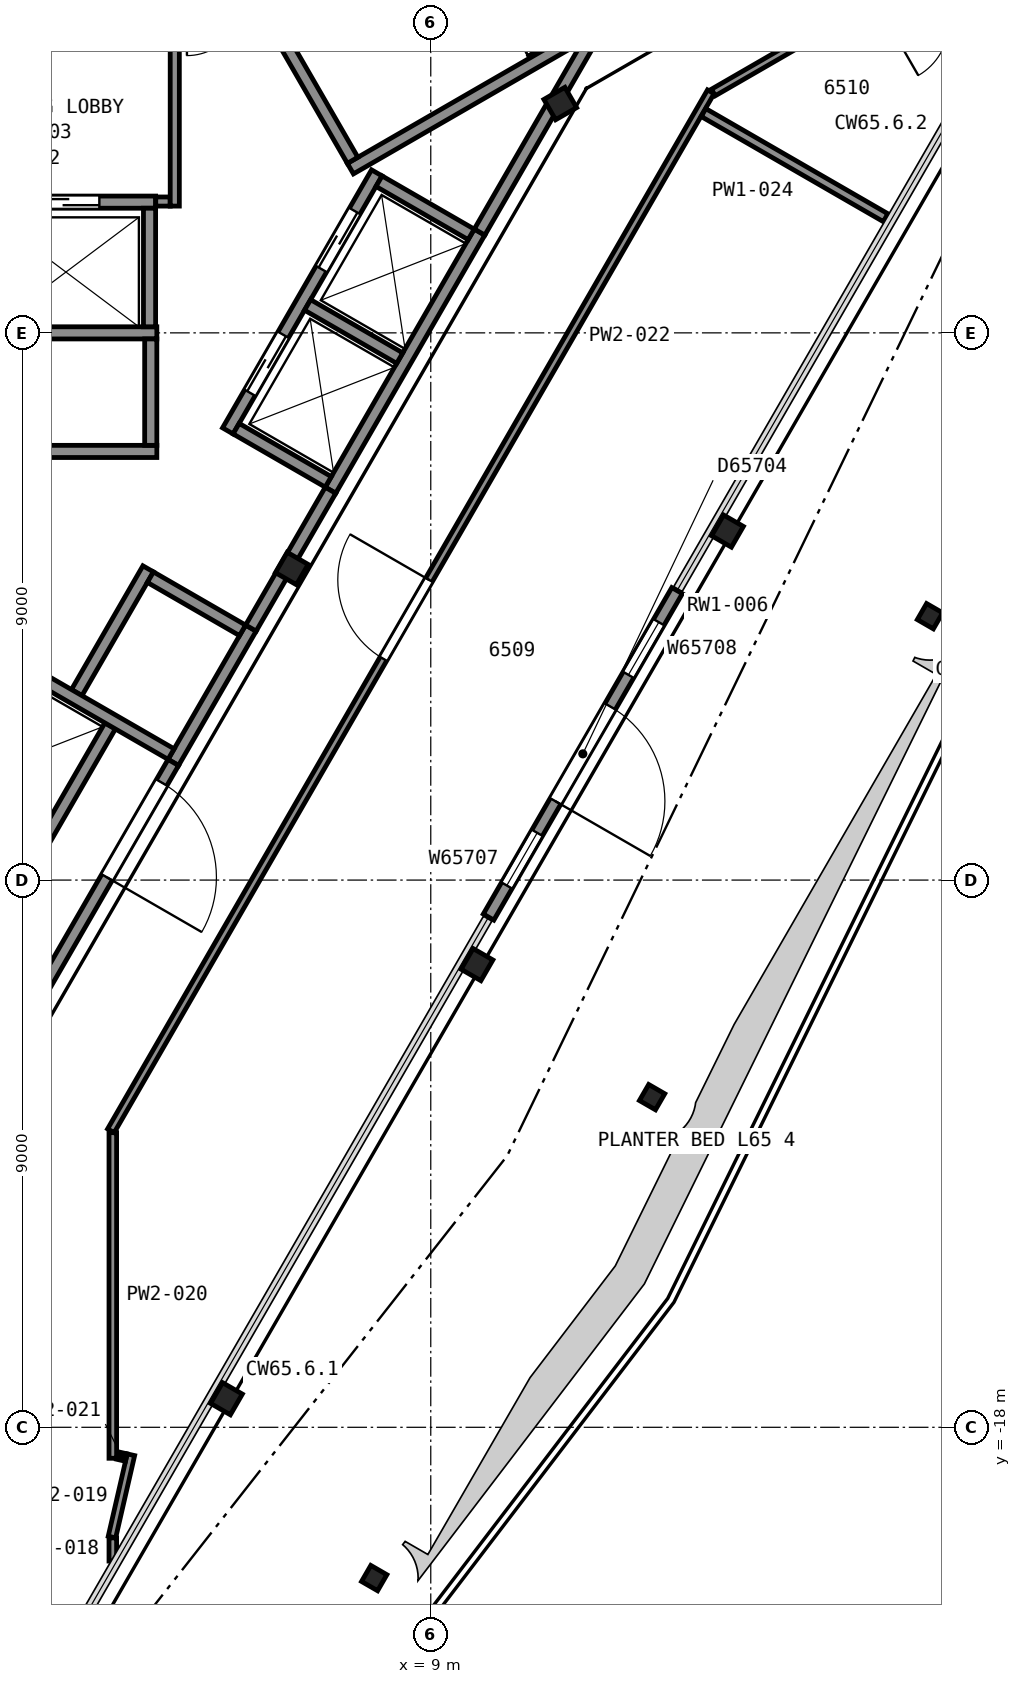
"""IFC4 building model, lengths in metres.
Left out: names, types, materials, properties, quantities, classifications, styles, units other than length and angle.
Written with IfcOpenShell. Run it as: python <this file> out.ifc"""

import sys

from ifc_helpers import new_model, si_unit, direction, frame, frame_2d, origin, origin_2d, place, context, subcontext, project, spatial, rectangle, hollow_rectangle, i_section, extrude, element, fill, save


model = new_model("IFC4")
c1 = context("Model", 3, precision=1e-05, world=origin(), true_north=direction((0.0, 1.0)))
c2 = subcontext(c1, "Body", "Model", "MODEL_VIEW")
j1 = project(units=[si_unit("LENGTHUNIT", "METRE"), si_unit("PLANEANGLEUNIT", "RADIAN")], contexts=[c1])
p1 = place(None, origin())
s1 = spatial("IfcSite", under=j1, at=p1, CompositionType="ELEMENT")
p2 = place(p1, origin())
s2 = spatial("IfcBuilding", under=s1, at=p2, CompositionType="ELEMENT")
p3 = place(p2, frame((0.0, 0.0, 258.2)))
s3 = spatial("IfcBuildingStorey", under=s2, at=p3, CompositionType="ELEMENT", Elevation=258.2)
for number, where, z_axis, x_axis in (
    (1, (5.64, -17.53, -0.16), (0.0, 0.0, 1.0), (-0.5, -0.866, 0.0)),
    (2, (9.76, -10.39, -0.16), (0.0, 0.0, 1.0), (-0.5, -0.866, 0.0)),
    (3, (13.88, -3.26, -0.16), (0.0, 0.0, 1.0), (-0.5, -0.866, 0.0)),
):
    element("IfcColumn", number, at=place(p3, frame(where, z_axis=z_axis, x_axis=x_axis)), inside=s3, PredefinedType="COLUMN", context=c2, shape_type="SweptSolid", body=[
        extrude(i_section(OverallWidth=0.394, OverallDepth=0.376, WebThickness=0.017, FlangeThickness=0.028, FilletRadius=0.015, at=origin_2d()), origin(), (0.0, 0.0, 1.0), 5.96),
    ])
p4 = place(p3, frame((11.537, 4.007, 0.065), z_axis=(-0.331310883947, -0.191156195649, 0.923954764609), x_axis=(0.941310345781, 3.9186308e-05, 0.337542340145)))
e4 = element("IfcColumn", 4, at=p4, inside=s3, PredefinedType="COLUMN", context=c2, shape_type="SweptSolid", body=[
    extrude(i_section(OverallWidth=0.399, OverallDepth=0.386, WebThickness=0.021, FlangeThickness=0.033, FilletRadius=0.015, at=origin_2d()), origin(), (0.0, 0.0, 1.0), 6.137),
])
p5 = place(p3, frame((6.923, -3.996, 0.04), z_axis=(-0.175584774284, 0.101313376069, 0.979237247489), x_axis=(0.984300834882, -5.9817855e-05, 0.176498903317)))
e5 = element("IfcColumn", 5, at=p5, inside=s3, PredefinedType="COLUMN", context=c2, shape_type="SweptSolid", body=[
    extrude(i_section(OverallWidth=0.399, OverallDepth=0.386, WebThickness=0.021, FlangeThickness=0.033, FilletRadius=0.015, at=origin_2d()), origin(), (0.0, 0.0, 1.0), 5.841),
])
for number, where, z_axis, x_axis in (
    (6, (8.07, -20.48, -0.69), (0.0, 0.0, 1.0), (-0.5, -0.866, 0.0)),
    (7, (12.64, -12.57, -0.69), (0.0, 0.0, 1.0), (-0.5, -0.866, 0.0)),
    (8, (17.21, -4.66, -0.69), (0.0, 0.0, 1.0), (-0.5, -0.866, 0.0)),
):
    element("IfcColumn", number, at=place(p3, frame(where, z_axis=z_axis, x_axis=x_axis)), inside=s3, PredefinedType="COLUMN", context=c2, shape_type="SweptSolid", body=[
        extrude(hollow_rectangle(XDim=0.305, YDim=0.305, WallThickness=0.013, InnerFilletRadius=0.006, OuterFilletRadius=0.019, at=origin_2d()), origin(), (0.0, 0.0, 1.0), 5.4),
    ])
p6 = place(p3, frame((9.951, -9.608, 0.0), z_axis=(0.0, 0.0, 1.0), x_axis=(0.500026960575, 0.86600983753, 0.0)))
e9 = element("IfcWall", 9, at=p6, inside=s3, PredefinedType="SOLIDWALL", context=c2, shape_type="SweptSolid", body=[
    extrude(rectangle(XDim=6.2, YDim=0.2, at=frame_2d((3.1, 0.0))), origin(), (0.0, 0.0, 1.0), 4.522),
])
p7 = place(p6, frame((0.6, 0.0, 0.9)))
e10 = element("IfcOpeningElement", 10, at=p7, cuts=e9, PredefinedType="OPENING", context=c2, shape_type="SweptSolid", body=[
    extrude(rectangle(XDim=1.0, YDim=1.5, at=frame_2d((0.5, 0.75))), frame((0.0, 0.11, 0.0), z_axis=(0.0, -1.0, 0.0), x_axis=(1.0, 0.0, 0.0)), (0.0, 0.0, 1.0), 0.22),
])
p8 = place(p6, frame((2.2, 0.0, 0.0)))
e11 = element("IfcOpeningElement", 11, at=p8, cuts=e9, PredefinedType="OPENING", context=c2, shape_type="SweptSolid", body=[
    extrude(rectangle(XDim=1.8, YDim=2.4, at=frame_2d((0.9, 1.2))), frame((0.0, 0.11, 0.0), z_axis=(0.0, -1.0, 0.0), x_axis=(1.0, 0.0, 0.0)), (0.0, 0.0, 1.0), 0.22),
])
p9 = place(p6, frame((4.6, 0.0, 0.9)))
e12 = element("IfcOpeningElement", 12, at=p9, cuts=e9, PredefinedType="OPENING", context=c2, shape_type="SweptSolid", body=[
    extrude(rectangle(XDim=1.0, YDim=1.5, at=frame_2d((0.5, 0.75))), frame((0.0, 0.11, 0.0), z_axis=(0.0, -1.0, 0.0), x_axis=(1.0, 0.0, 0.0)), (0.0, 0.0, 1.0), 0.22),
])
p10 = place(p3, frame((7.678, 2.701, 0.0), z_axis=(0.0, 0.0, 1.0), x_axis=(0.866019993635, 0.500009370536, 0.0)))
e13 = element("IfcWall", 13, at=p10, inside=s3, PredefinedType="PARTITIONING", context=c2, shape_type="SweptSolid", body=[
    extrude(rectangle(XDim=9.6, YDim=0.2, at=frame_2d((4.8, 0.0))), origin(), (0.0, 0.0, 1.0), 5.55),
])
p11 = place(p3, frame((7.715, 2.838, 0.0), z_axis=(0.0, 0.0, 1.0), x_axis=(-0.500049511043, 0.865996816683, 0.0)))
e14 = element("IfcWall", 14, at=p11, inside=s3, PredefinedType="PARTITIONING", context=c2, shape_type="SweptSolid", body=[
    extrude(rectangle(XDim=2.8, YDim=0.2, at=frame_2d((1.4, 0.0))), origin(), (0.0, 0.0, 1.0), 5.55),
])
p12 = place(p3, frame((-2.755, -1.95, 0.0), z_axis=(0.0, 0.0, 1.0), x_axis=(1.0, 0.0, 0.0)))
e15 = element("IfcWall", 15, at=p12, inside=s3, PredefinedType="PARTITIONING", context=c2, shape_type="SweptSolid", body=[
    extrude(rectangle(XDim=7.25, YDim=0.2, at=frame_2d((3.625, 0.0))), origin(), (0.0, 0.0, 1.0), 5.55),
])
p13 = place(p12, frame((0.725, 0.0, 0.0)))
e16 = element("IfcOpeningElement", 16, at=p13, cuts=e15, PredefinedType="OPENING", context=c2, shape_type="SweptSolid", body=[
    extrude(rectangle(XDim=1.1, YDim=2.1, at=frame_2d((0.55, 1.05))), frame((0.0, 0.11, 0.0), z_axis=(0.0, -1.0, 0.0), x_axis=(1.0, 0.0, 0.0)), (0.0, 0.0, 1.0), 0.22),
])
p14 = place(p3, frame((-2.785, 0.0, 0.0), z_axis=(0.0, 0.0, 1.0), x_axis=(1.0, 0.0, 0.0)))
e17 = element("IfcWall", 17, at=p14, inside=s3, PredefinedType="PARTITIONING", context=c2, shape_type="SweptSolid", body=[
    extrude(rectangle(XDim=7.28, YDim=0.2, at=frame_2d((3.64, 0.0))), origin(), (0.0, 0.0, 1.0), 5.55),
])
p15 = place(p3, frame((1.525, 2.15, 0.0), z_axis=(0.0, 0.0, 1.0), x_axis=(1.0, 0.0, 0.0)))
e18 = element("IfcWall", 18, at=p15, inside=s3, PredefinedType="PARTITIONING", context=c2, shape_type="SweptSolid", body=[
    extrude(rectangle(XDim=2.95, YDim=0.2, at=frame_2d((1.475, 0.0))), origin(), (0.0, 0.0, 1.0), 5.8),
])
p16 = place(p15, frame((0.925, 0.0, 0.0)))
e19 = element("IfcOpeningElement", 19, at=p16, cuts=e18, PredefinedType="OPENING", context=c2, shape_type="SweptSolid", body=[
    extrude(rectangle(XDim=1.1, YDim=2.1, at=frame_2d((0.55, 1.05))), frame((0.0, 0.11, 0.0), z_axis=(0.0, -1.0, 0.0), x_axis=(1.0, 0.0, 0.0)), (0.0, 0.0, 1.0), 0.22),
])
p17 = place(p3, frame((4.766, -7.065, 0.0), z_axis=(0.0, 0.0, 1.0), x_axis=(0.499948979701, 0.866054858364, 0.0)))
e20 = element("IfcWall", 20, at=p17, inside=s3, PredefinedType="PARTITIONING", context=c2, shape_type="SweptSolid", body=[
    extrude(rectangle(XDim=2.55, YDim=0.2, at=frame_2d((1.275, 0.0))), origin(), (0.0, 0.0, 1.0), 5.55),
])
p18 = place(p3, frame((7.351, -2.587, 0.0), z_axis=(0.0, 0.0, 1.0), x_axis=(0.500002801628, 0.866023786258, 0.0)))
e21 = element("IfcWall", 21, at=p18, inside=s3, PredefinedType="PARTITIONING", context=c2, shape_type="SweptSolid", body=[
    extrude(rectangle(XDim=4.9, YDim=0.2, at=frame_2d((2.45, 0.0))), origin(), (0.0, 0.0, 1.0), 4.897),
])
p19 = place(p3, frame((2.552, -8.5, 0.0), z_axis=(0.0, 0.0, 1.0), x_axis=(0.500016218704, 0.866016039709, 0.0)))
e22 = element("IfcWall", 22, at=p19, inside=s3, PredefinedType="PARTITIONING", context=c2, shape_type="SweptSolid", body=[
    extrude(rectangle(XDim=2.35, YDim=0.2, at=frame_2d((1.175, 0.0))), origin(), (0.0, 0.0, 1.0), 5.8),
])
p20 = place(p3, frame((3.177, -5.917, 0.0), z_axis=(0.0, 0.0, 1.0), x_axis=(0.500016218704, 0.866016039709, 0.0)))
e23 = element("IfcWall", 23, at=p20, inside=s3, PredefinedType="PARTITIONING", context=c2, shape_type="SweptSolid", body=[
    extrude(rectangle(XDim=2.35, YDim=0.2, at=frame_2d((1.175, 0.0))), origin(), (0.0, 0.0, 1.0), 5.55),
])
p21 = place(p3, frame((5.663, -1.612, 0.0), z_axis=(0.0, 0.0, 1.0), x_axis=(0.49998122708, 0.866036242063, 0.0)))
e24 = element("IfcWall", 24, at=p21, inside=s3, PredefinedType="PARTITIONING", context=c2, shape_type="SweptSolid", body=[
    extrude(rectangle(XDim=4.9, YDim=0.2, at=frame_2d((2.45, 0.0))), origin(), (0.0, 0.0, 1.0), 5.55),
])
p22 = place(p21, frame((3.075, 0.0, 0.0)))
e25 = element("IfcOpeningElement", 25, at=p22, cuts=e24, PredefinedType="OPENING", context=c2, shape_type="SweptSolid", body=[
    extrude(rectangle(XDim=1.1, YDim=2.1, at=frame_2d((0.55, 1.05))), frame((0.0, 0.11, 0.0), z_axis=(0.0, -1.0, 0.0), x_axis=(1.0, 0.0, 0.0)), (0.0, 0.0, 1.0), 0.22),
])
p23 = place(p21, frame((0.725, 0.0, 0.0)))
e26 = element("IfcOpeningElement", 26, at=p23, cuts=e24, PredefinedType="OPENING", context=c2, shape_type="SweptSolid", body=[
    extrude(rectangle(XDim=1.1, YDim=2.1, at=frame_2d((0.55, 1.05))), frame((0.0, 0.11, 0.0), z_axis=(0.0, -1.0, 0.0), x_axis=(1.0, 0.0, 0.0)), (0.0, 0.0, 1.0), 0.22),
])
p24 = place(p3, frame((4.395, -1.85, 0.0), z_axis=(0.0, 0.0, 1.0), x_axis=(0.0, 1.0, 0.0)))
e27 = element("IfcWall", 27, at=p24, inside=s3, PredefinedType="PARTITIONING", context=c2, shape_type="SweptSolid", body=[
    extrude(rectangle(XDim=1.75, YDim=0.2, at=frame_2d((0.875, 0.0))), origin(), (0.0, 0.0, 1.0), 5.55),
])
p25 = place(p3, frame((4.375, 0.1, 0.0), z_axis=(0.0, 0.0, 1.0), x_axis=(0.0, 1.0, 0.0)))
e28 = element("IfcWall", 28, at=p25, inside=s3, PredefinedType="PARTITIONING", context=c2, shape_type="SweptSolid", body=[
    extrude(rectangle(XDim=1.95, YDim=0.2, at=frame_2d((0.975, 0.0))), origin(), (0.0, 0.0, 1.0), 5.8),
])
p26 = place(p3, frame((9.665, 1.62, 0.0), z_axis=(0.0, 0.0, 1.0), x_axis=(-0.866002029911, 0.500040482552, 0.0)))
e29 = element("IfcWall", 29, at=p26, inside=s3, PredefinedType="PARTITIONING", context=c2, shape_type="SweptSolid", body=[
    extrude(rectangle(XDim=1.75, YDim=0.2, at=frame_2d((0.875, 0.0))), origin(), (0.0, 0.0, 1.0), 4.933),
])
for number, where, z_axis, x_axis in (
    (30, (8.49, -0.416, 0.0), (0.0, 0.0, 1.0), (-0.866, 0.5, 0.0)),
    (31, (7.315, -2.451, 0.0), (0.0, 0.0, 1.0), (-0.866, 0.5, 0.0)),
):
    element("IfcWall", number, at=place(p3, frame(where, z_axis=z_axis, x_axis=x_axis)), inside=s3, PredefinedType="PARTITIONING", context=c2, shape_type="SweptSolid", body=[
        extrude(rectangle(XDim=1.75, YDim=0.2, at=frame_2d((0.875, 0.0))), origin(), (0.0, 0.0, 1.0), 4.933),
    ])
p27 = place(p3, frame((5.905, -4.893, 0.0), z_axis=(0.0, 0.0, 1.0), x_axis=(-0.866002029911, 0.500040482552, 0.0)))
e32 = element("IfcWall", 32, at=p27, inside=s3, PredefinedType="PARTITIONING", context=c2, shape_type="SweptSolid", body=[
    extrude(rectangle(XDim=1.75, YDim=0.2, at=frame_2d((0.875, 0.0))), origin(), (0.0, 0.0, 1.0), 4.933),
])
p28 = place(p3, frame((4.73, -6.928, 0.0), z_axis=(0.0, 0.0, 1.0), x_axis=(-0.866024349092, 0.500001826776, 0.0)))
e33 = element("IfcWall", 33, at=p28, inside=s3, PredefinedType="PARTITIONING", context=c2, shape_type="SweptSolid", body=[
    extrude(rectangle(XDim=2.95, YDim=0.2, at=frame_2d((1.475, 0.0))), origin(), (0.0, 0.0, 1.0), 4.933),
])
p29 = place(p3, frame((1.677, -12.415, 0.0), z_axis=(0.0, 0.0, 1.0), x_axis=(0.500054337157, 0.865994029939, 0.0)))
e34 = element("IfcWall", 34, at=p29, inside=s3, PredefinedType="PARTITIONING", context=c2, shape_type="SweptSolid", body=[
    extrude(rectangle(XDim=6.177, YDim=0.2, at=frame_2d((3.088, 0.0))), origin(), (0.0, 0.0, 1.0), 4.897),
])
p30 = place(p29, frame((3.995, 0.0, 0.0)))
e35 = element("IfcOpeningElement", 35, at=p30, cuts=e34, PredefinedType="OPENING", context=c2, shape_type="SweptSolid", body=[
    extrude(rectangle(XDim=1.8, YDim=2.1, at=frame_2d((0.9, 1.05))), frame((0.0, 0.11, 0.0), z_axis=(0.0, -1.0, 0.0), x_axis=(1.0, 0.0, 0.0)), (0.0, 0.0, 1.0), 0.22),
])
p31 = place(p3, frame((4.477, 2.16, 0.0), z_axis=(0.0, 0.0, 1.0), x_axis=(1.0, 0.0, 0.0)))
e36 = element("IfcWall", 36, at=p31, inside=s3, PredefinedType="PARTITIONING", context=c2, shape_type="SweptSolid", body=[
    extrude(rectangle(XDim=0.238, YDim=0.15, at=frame_2d((0.119, 0.0))), origin(), (0.0, 0.0, 1.0), 5.55),
])
p32 = place(p3, frame((4.79, 2.085, 0.0), z_axis=(0.0, 0.0, 1.0), x_axis=(0.0, 1.0, 0.0)))
e37 = element("IfcWall", 37, at=p32, inside=s3, PredefinedType="PARTITIONING", context=c2, shape_type="SweptSolid", body=[
    extrude(rectangle(XDim=2.98, YDim=0.15, at=frame_2d((1.49, 0.0))), origin(), (0.0, 0.0, 1.0), 5.55),
])
p33 = place(p3, frame((6.042, -4.855, 0.0), z_axis=(0.0, 0.0, 1.0), x_axis=(0.500252727967, 0.865879442048, 0.0)))
e38 = element("IfcWall", 38, at=p33, inside=s3, PredefinedType="PARTITIONING", context=c2, shape_type="SweptSolid", body=[
    extrude(rectangle(XDim=2.617, YDim=0.2, at=frame_2d((1.309, 0.0))), origin(), (0.0, 0.0, 1.0), 5.19),
])
p34 = place(p3, frame((9.803, 1.658, 0.0), z_axis=(0.0, 0.0, 1.0), x_axis=(0.499943114462, 0.866058244174, 0.0)))
e39 = element("IfcWall", 39, at=p34, inside=s3, PredefinedType="PARTITIONING", context=c2, shape_type="SweptSolid", body=[
    extrude(rectangle(XDim=3.576, YDim=0.2, at=frame_2d((1.788, 0.0))), origin(), (0.0, 0.0, 1.0), 4.933),
])
p35 = place(p3, frame((3.771, -20.2, 0.0), z_axis=(0.0, 0.0, 1.0), x_axis=(0.0, 1.0, 0.0)))
e40 = element("IfcWall", 40, at=p35, inside=s3, PredefinedType="PARTITIONING", context=c2, shape_type="SweptSolid", body=[
    extrude(rectangle(XDim=0.381, YDim=0.125, at=frame_2d((0.19, 0.0))), origin(), (0.0, 0.0, 1.0), 4.462),
])
p36 = place(p3, frame((3.757, -19.805, 0.0), z_axis=(0.0, 0.0, 1.0), x_axis=(0.224589971175, 0.974453356938, 0.0)))
e41 = element("IfcWall", 41, at=p36, inside=s3, PredefinedType="PARTITIONING", context=c2, shape_type="SweptSolid", body=[
    extrude(rectangle(XDim=1.389, YDim=0.125, at=frame_2d((0.695, 0.0))), origin(), (0.0, 0.0, 1.0), 4.462),
])
p37 = place(p3, frame((3.771, -18.51, 0.0), z_axis=(0.0, 0.0, 1.0), x_axis=(0.0, 1.0, 0.0)))
e42 = element("IfcWall", 42, at=p37, inside=s3, PredefinedType="PARTITIONING", context=c2, shape_type="SweptSolid", body=[
    extrude(rectangle(XDim=5.355, YDim=0.125, at=frame_2d((2.678, 0.0))), origin(), (0.0, 0.0, 1.0), 4.462),
])
p38 = place(p3, frame((3.844, -18.464, 0.0), z_axis=(0.0, 0.0, 1.0), x_axis=(0.974607944108, -0.223918188812, 0.0)))
e43 = element("IfcWall", 43, at=p38, inside=s3, PredefinedType="PARTITIONING", context=c2, shape_type="SweptSolid", body=[
    extrude(rectangle(XDim=0.152, YDim=0.125, at=frame_2d((0.076, 0.0))), origin(), (0.0, 0.0, 1.0), 4.462),
])
p39 = place(p3, frame((13.605, 3.965, 0.0), z_axis=(0.0, 0.0, 1.0), x_axis=(-0.499986289957, -0.866033319137, 0.0)))
e44 = element("IfcWall", 44, at=p39, inside=s3, PredefinedType="PARTITIONING", context=c2, shape_type="SweptSolid", body=[
    extrude(rectangle(XDim=19.731, YDim=0.125, at=frame_2d((9.866, 0.0))), origin(), (0.0, 0.0, 1.0), 4.462),
])
p40 = place(p39, frame((9.269, 0.0, 0.0)))
e45 = element("IfcOpeningElement", 45, at=p40, cuts=e44, PredefinedType="OPENING", context=c2, shape_type="SweptSolid", body=[
    extrude(rectangle(XDim=1.5, YDim=2.1, at=frame_2d((0.75, 1.05))), frame((0.0, 0.073, 0.0), z_axis=(0.0, -1.0, 0.0), x_axis=(1.0, 0.0, 0.0)), (0.0, 0.0, 1.0), 0.145),
])
p41 = place(p3, frame((13.485, 3.623, 0.0), z_axis=(0.0, 0.0, 1.0), x_axis=(0.866041005548, -0.49997297598, 0.0)))
e46 = element("IfcWall", 46, at=p41, inside=s3, PredefinedType="PARTITIONING", context=c2, shape_type="SweptSolid", body=[
    extrude(rectangle(XDim=3.459, YDim=0.15, at=frame_2d((1.729, 0.0))), origin(), (0.0, 0.0, 1.0), 4.462),
])
p42 = place(p3, frame((13.648, 3.954, 0.0), z_axis=(0.0, 0.0, 1.0), x_axis=(0.865930689144, 0.500164014697, 0.0)))
e47 = element("IfcWall", 47, at=p42, inside=s3, PredefinedType="PARTITIONING", context=c2, shape_type="SweptSolid", body=[
    extrude(rectangle(XDim=1.755, YDim=0.125, at=frame_2d((0.877, 0.0))), origin(), (0.0, 0.0, 1.0), 4.462),
])
p43 = place(p7, origin())
e48 = element("IfcWindow", 48, at=p43, inside=s3, PartitioningType="SINGLE_PANEL", PredefinedType="WINDOW", context=c2, shape_type="SweptSolid", body=[
    extrude(rectangle(XDim=1.0, YDim=1.5, at=frame_2d((0.5, 0.75))), frame((0.0, 0.03, 0.0), z_axis=(0.0, -1.0, 0.0), x_axis=(1.0, 0.0, 0.0)), (0.0, 0.0, 1.0), 0.06),
])
fill(e10, e48)
p44 = place(p8, frame((1.8, 0.0, 0.0), z_axis=(0.0, 0.0, 1.0), x_axis=(-1.0, 0.0, 0.0)))
e49 = element("IfcDoor", 49, at=p44, inside=s3, OperationType="DOUBLE_DOOR_SINGLE_SWING", PredefinedType="DOOR", context=c2, shape_type="SweptSolid", body=[
    extrude(rectangle(XDim=1.8, YDim=2.4, at=frame_2d((0.9, 1.2))), frame((0.0, 0.025, 0.0), z_axis=(0.0, -1.0, 0.0), x_axis=(1.0, 0.0, 0.0)), (0.0, 0.0, 1.0), 0.05),
])
fill(e11, e49)
p45 = place(p9, origin())
e50 = element("IfcWindow", 50, at=p45, inside=s3, PartitioningType="SINGLE_PANEL", PredefinedType="WINDOW", context=c2, shape_type="SweptSolid", body=[
    extrude(rectangle(XDim=1.0, YDim=1.5, at=frame_2d((0.5, 0.75))), frame((0.0, 0.03, 0.0), z_axis=(0.0, -1.0, 0.0), x_axis=(1.0, 0.0, 0.0)), (0.0, 0.0, 1.0), 0.06),
])
fill(e12, e50)
p46 = place(p22, origin())
e51 = element("IfcDoor", 51, at=p46, inside=s3, OperationType="SLIDING_TO_LEFT", PredefinedType="DOOR", context=c2, shape_type="SweptSolid", body=[
    extrude(rectangle(XDim=1.1, YDim=2.1, at=frame_2d((0.55, 1.05))), frame((0.0, 0.025, 0.0), z_axis=(0.0, -1.0, 0.0), x_axis=(1.0, 0.0, 0.0)), (0.0, 0.0, 1.0), 0.05),
])
fill(e25, e51)
p47 = place(p23, origin())
e52 = element("IfcDoor", 52, at=p47, inside=s3, OperationType="SLIDING_TO_LEFT", PredefinedType="DOOR", context=c2, shape_type="SweptSolid", body=[
    extrude(rectangle(XDim=1.1, YDim=2.1, at=frame_2d((0.55, 1.05))), frame((0.0, 0.025, 0.0), z_axis=(0.0, -1.0, 0.0), x_axis=(1.0, 0.0, 0.0)), (0.0, 0.0, 1.0), 0.05),
])
fill(e26, e52)
p48 = place(p16, origin())
e53 = element("IfcDoor", 53, at=p48, inside=s3, OperationType="SLIDING_TO_RIGHT", PredefinedType="DOOR", context=c2, shape_type="SweptSolid", body=[
    extrude(rectangle(XDim=1.1, YDim=2.1, at=frame_2d((0.55, 1.05))), frame((0.0, 0.025, 0.0), z_axis=(0.0, -1.0, 0.0), x_axis=(1.0, 0.0, 0.0)), (0.0, 0.0, 1.0), 0.05),
])
fill(e19, e53)
p49 = place(p30, origin())
e54 = element("IfcDoor", 54, at=p49, inside=s3, OperationType="DOUBLE_DOOR_SINGLE_SWING", PredefinedType="DOOR", context=c2, shape_type="SweptSolid", body=[
    extrude(rectangle(XDim=1.8, YDim=2.1, at=frame_2d((0.9, 1.05))), frame((0.0, 0.025, 0.0), z_axis=(0.0, -1.0, 0.0), x_axis=(1.0, 0.0, 0.0)), (0.0, 0.0, 1.0), 0.05),
])
fill(e35, e54)
p50 = place(p40, origin())
e55 = element("IfcDoor", 55, at=p50, inside=s3, OperationType="DOUBLE_DOOR_SINGLE_SWING", PredefinedType="DOOR", context=c2, shape_type="SweptSolid", body=[
    extrude(rectangle(XDim=1.5, YDim=2.1, at=frame_2d((0.75, 1.05))), frame((0.0, 0.025, 0.0), z_axis=(0.0, -1.0, 0.0), x_axis=(1.0, 0.0, 0.0)), (0.0, 0.0, 1.0), 0.05),
])
fill(e45, e55)
save(model, sys.argv[1])
